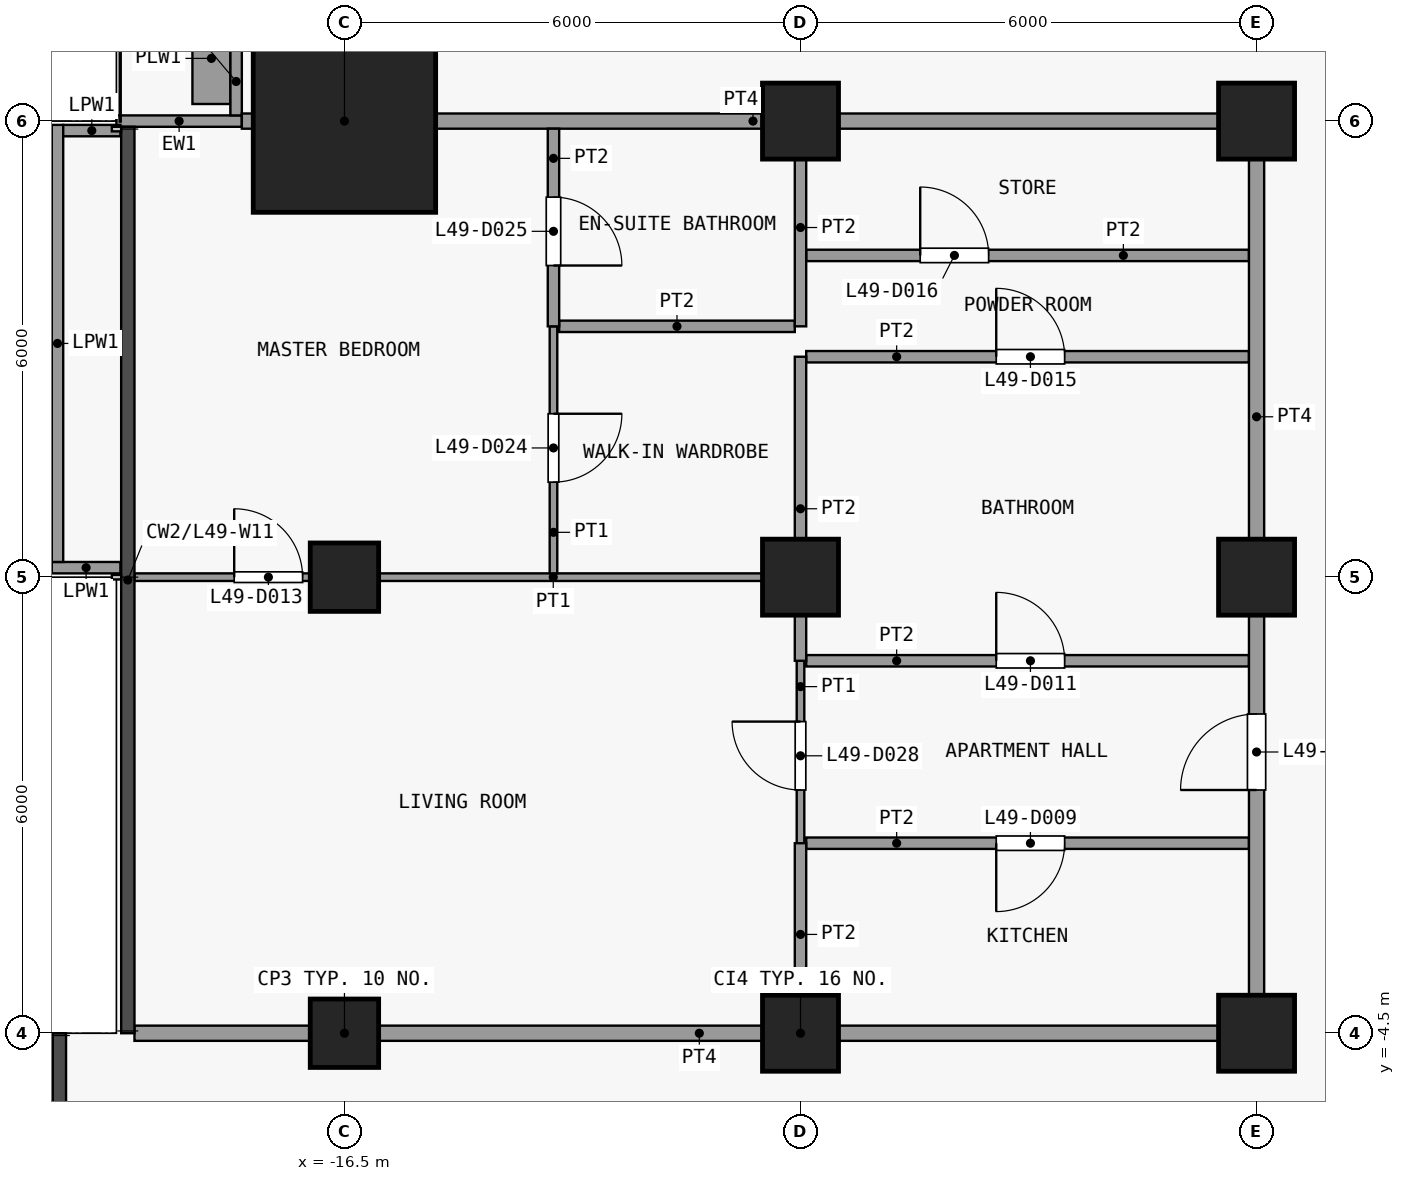
"""IFC4 building model, lengths in metres.
Left out: names, types, materials, properties, quantities, classifications, styles, units other than length and angle.
Written with IfcOpenShell. Run it as: python <this file> out.ifc"""

import sys

from ifc_helpers import new_model, si_unit, direction, frame, frame_2d, origin, origin_2d, place, context, subcontext, project, spatial, rectangle, extrude, element, fill, save


model = new_model("IFC4")
c1 = context("Model", 3, precision=1e-05, world=origin(), true_north=direction((0.0, 1.0)))
c2 = subcontext(c1, "Body", "Model", "MODEL_VIEW")
j1 = project(units=[si_unit("LENGTHUNIT", "METRE"), si_unit("PLANEANGLEUNIT", "RADIAN")], contexts=[c1])
p1 = place(None, origin())
s1 = spatial("IfcSite", under=j1, at=p1, CompositionType="ELEMENT")
p2 = place(p1, origin())
s2 = spatial("IfcBuilding", under=s1, at=p2, CompositionType="ELEMENT")
p3 = place(p2, frame((0.0, 0.0, 196.1)))
s3 = spatial("IfcBuildingStorey", under=s2, at=p3, CompositionType="ELEMENT", Elevation=196.1)
for number, where, z_axis, x_axis in (
    (1, (-16.5, -4.5, 0.0), (0.0, 0.0, 1.0), (1.0, 0.0, 0.0)),
    (2, (-16.5, 1.5, 0.0), (0.0, 0.0, 1.0), (1.0, 0.0, 0.0)),
):
    element("IfcColumn", number, at=place(p3, frame(where, z_axis=z_axis, x_axis=x_axis)), inside=s3, PredefinedType="COLUMN", context=c2, shape_type="SweptSolid", body=[
        extrude(rectangle(XDim=0.9, YDim=0.9, at=origin_2d()), origin(), (0.0, 0.0, 1.0), 3.6),
    ])
p4 = place(p3, frame((-16.5, 7.5, 0.0), z_axis=(0.0, 0.0, 1.0), x_axis=(1.0, 0.0, 0.0)))
e3 = element("IfcColumn", 3, at=p4, inside=s3, PredefinedType="COLUMN", context=c2, shape_type="SweptSolid", body=[
    extrude(rectangle(XDim=2.4, YDim=2.4, at=origin_2d()), origin(), (0.0, 0.0, 1.0), 3.6),
])
for number, where, z_axis, x_axis in (
    (4, (-10.5, -4.5, 0.0), (0.0, 0.0, 1.0), (1.0, 0.0, 0.0)),
    (5, (-10.5, 1.5, 0.0), (0.0, 0.0, 1.0), (1.0, 0.0, 0.0)),
    (6, (-10.5, 7.5, 0.0), (0.0, 0.0, 1.0), (1.0, 0.0, 0.0)),
    (7, (-4.5, -4.5, 0.0), (0.0, 0.0, 1.0), (1.0, 0.0, 0.0)),
    (8, (-4.5, 1.5, 0.0), (0.0, 0.0, 1.0), (1.0, 0.0, 0.0)),
    (9, (-4.5, 7.5, 0.0), (0.0, 0.0, 1.0), (1.0, 0.0, 0.0)),
):
    element("IfcColumn", number, at=place(p3, frame(where, z_axis=z_axis, x_axis=x_axis)), inside=s3, PredefinedType="COLUMN", context=c2, shape_type="SweptSolid", body=[
        extrude(rectangle(XDim=1.0, YDim=1.0, at=origin_2d()), origin(), (0.0, 0.0, 1.0), 3.6),
    ])
p5 = place(p3, frame((-17.85, 7.5, 0.0), z_axis=(0.0, 0.0, 1.0), x_axis=(-1.0, 0.0, 0.0)))
e10 = element("IfcWall", 10, at=p5, inside=s3, PredefinedType="SOLIDWALL", context=c2, shape_type="SweptSolid", body=[
    extrude(rectangle(XDim=1.65, YDim=0.15, at=frame_2d((0.825, 0.0))), origin(), (0.0, 0.0, 1.0), 3.15),
])
p6 = place(p3, frame((-17.925, 7.575, 0.0), z_axis=(0.0, 0.0, 1.0), x_axis=(0.0, 1.0, 0.0)))
e11 = element("IfcWall", 11, at=p6, inside=s3, PredefinedType="SOLIDWALL", context=c2, shape_type="SweptSolid", body=[
    extrude(rectangle(XDim=5.85, YDim=0.15, at=frame_2d((2.925, 0.0))), origin(), (0.0, 0.0, 1.0), 3.15),
])
p7 = place(p6, frame((3.825, 0.0, 0.0)))
e12 = element("IfcOpeningElement", 12, at=p7, cuts=e11, PredefinedType="OPENING", context=c2, shape_type="SweptSolid", body=[
    extrude(rectangle(XDim=1.2, YDim=2.4, at=frame_2d((0.6, 1.2))), frame((0.0, 0.085, 0.0), z_axis=(0.0, -1.0, 0.0), x_axis=(1.0, 0.0, 0.0)), (0.0, 0.0, 1.0), 0.17),
])
p8 = place(p6, frame((1.012, 0.0, 0.9)))
e13 = element("IfcOpeningElement", 13, at=p8, cuts=e11, PredefinedType="OPENING", context=c2, shape_type="SweptSolid", body=[
    extrude(rectangle(XDim=1.8, YDim=2.1, at=frame_2d((0.9, 1.05))), frame((0.0, 0.085, 0.0), z_axis=(0.0, -1.0, 0.0), x_axis=(1.0, 0.0, 0.0)), (0.0, 0.0, 1.0), 0.17),
])
p9 = place(p3, frame((-18.25, 7.725, 0.0), z_axis=(0.0, 0.0, 1.0), x_axis=(0.0, 1.0, 0.0)))
e14 = element("IfcWall", 14, at=p9, inside=s3, PredefinedType="USERDEFINED", context=c2, shape_type="SweptSolid", body=[
    extrude(rectangle(XDim=1.2, YDim=0.5, at=frame_2d((0.6, 0.0))), origin(), (0.0, 0.0, 1.0), 0.9),
])
p10 = place(p3, frame((-19.448, 1.625, 0.0), z_axis=(0.0, 0.0, 1.0), x_axis=(-1.0, 0.0, 0.0)))
e15 = element("IfcWall", 15, at=p10, inside=s3, PredefinedType="PARAPET", context=c2, shape_type="SweptSolid", body=[
    extrude(rectangle(XDim=0.903, YDim=0.15, at=frame_2d((0.451, 0.0))), origin(), (0.0, 0.0, 1.0), 1.15),
])
p11 = place(p3, frame((-20.275, 1.7, 0.0), z_axis=(0.0, 0.0, 1.0), x_axis=(0.0, 1.0, 0.0)))
e16 = element("IfcWall", 16, at=p11, inside=s3, PredefinedType="PARAPET", context=c2, shape_type="SweptSolid", body=[
    extrude(rectangle(XDim=5.75, YDim=0.15, at=frame_2d((2.875, 0.0))), origin(), (0.0, 0.0, 1.0), 1.15),
])
p12 = place(p3, frame((-20.2, 7.375, 0.0), z_axis=(0.0, 0.0, 1.0), x_axis=(1.0, 0.0, 0.0)))
e17 = element("IfcWall", 17, at=p12, inside=s3, PredefinedType="PARAPET", context=c2, shape_type="SweptSolid", body=[
    extrude(rectangle(XDim=0.752, YDim=0.15, at=frame_2d((0.376, 0.0))), origin(), (0.0, 0.0, 1.0), 1.15),
])
p13 = place(p3, frame((-19.262, -4.5, 0.0), z_axis=(0.0, 0.0, 1.0), x_axis=(1.0, 0.0, 0.0)))
e18 = element("IfcWall", 18, at=p13, inside=s3, PredefinedType="PARTITIONING", context=c2, shape_type="SweptSolid", body=[
    extrude(rectangle(XDim=14.863, YDim=0.2, at=frame_2d((7.431, 0.0))), origin(), (0.0, 0.0, 1.0), 3.15),
])
p14 = place(p3, frame((-10.425, -2.0, 0.0), z_axis=(0.0, 0.0, 1.0), x_axis=(1.0, 0.0, 0.0)))
e19 = element("IfcWall", 19, at=p14, inside=s3, PredefinedType="PARTITIONING", context=c2, shape_type="SweptSolid", body=[
    extrude(rectangle(XDim=5.825, YDim=0.15, at=frame_2d((2.913, 0.0))), origin(), (0.0, 0.0, 1.0), 3.15),
])
p15 = place(p14, frame((2.5, 0.0, 0.0)))
e20 = element("IfcOpeningElement", 20, at=p15, cuts=e19, PredefinedType="OPENING", context=c2, shape_type="SweptSolid", body=[
    extrude(rectangle(XDim=0.9, YDim=2.1, at=frame_2d((0.45, 1.05))), frame((0.0, 0.085, 0.0), z_axis=(0.0, -1.0, 0.0), x_axis=(1.0, 0.0, 0.0)), (0.0, 0.0, 1.0), 0.17),
])
p16 = place(p3, frame((-10.425, 0.4, 0.0), z_axis=(0.0, 0.0, 1.0), x_axis=(1.0, 0.0, 0.0)))
e21 = element("IfcWall", 21, at=p16, inside=s3, PredefinedType="PARTITIONING", context=c2, shape_type="SweptSolid", body=[
    extrude(rectangle(XDim=5.825, YDim=0.15, at=frame_2d((2.913, 0.0))), origin(), (0.0, 0.0, 1.0), 3.15),
])
p17 = place(p16, frame((2.5, 0.0, 0.0)))
e22 = element("IfcOpeningElement", 22, at=p17, cuts=e21, PredefinedType="OPENING", context=c2, shape_type="SweptSolid", body=[
    extrude(rectangle(XDim=0.9, YDim=2.1, at=frame_2d((0.45, 1.05))), frame((0.0, 0.085, 0.0), z_axis=(0.0, -1.0, 0.0), x_axis=(1.0, 0.0, 0.0)), (0.0, 0.0, 1.0), 0.17),
])
p18 = place(p3, frame((-19.262, 1.5, 0.0), z_axis=(0.0, 0.0, 1.0), x_axis=(1.0, 0.0, 0.0)))
e23 = element("IfcWall", 23, at=p18, inside=s3, PredefinedType="PARTITIONING", context=c2, shape_type="SweptSolid", body=[
    extrude(rectangle(XDim=8.688, YDim=0.1, at=frame_2d((4.344, 0.0))), origin(), (0.0, 0.0, 1.0), 3.15),
])
p19 = place(p18, frame((1.312, 0.0, 0.0)))
e24 = element("IfcOpeningElement", 24, at=p19, cuts=e23, PredefinedType="OPENING", context=c2, shape_type="SweptSolid", body=[
    extrude(rectangle(XDim=0.9, YDim=2.1, at=frame_2d((0.45, 1.05))), frame((0.0, 0.06, 0.0), z_axis=(0.0, -1.0, 0.0), x_axis=(1.0, 0.0, 0.0)), (0.0, 0.0, 1.0), 0.12),
])
p20 = place(p3, frame((-10.425, 4.4, 0.0), z_axis=(0.0, 0.0, 1.0), x_axis=(1.0, 0.0, 0.0)))
e25 = element("IfcWall", 25, at=p20, inside=s3, PredefinedType="PARTITIONING", context=c2, shape_type="SweptSolid", body=[
    extrude(rectangle(XDim=5.825, YDim=0.15, at=frame_2d((2.913, 0.0))), origin(), (0.0, 0.0, 1.0), 3.15),
])
p21 = place(p20, frame((2.5, 0.0, 0.0)))
e26 = element("IfcOpeningElement", 26, at=p21, cuts=e25, PredefinedType="OPENING", context=c2, shape_type="SweptSolid", body=[
    extrude(rectangle(XDim=0.9, YDim=2.1, at=frame_2d((0.45, 1.05))), frame((0.0, 0.085, 0.0), z_axis=(0.0, -1.0, 0.0), x_axis=(1.0, 0.0, 0.0)), (0.0, 0.0, 1.0), 0.17),
])
p22 = place(p3, frame((-13.675, 4.8, 0.0), z_axis=(0.0, 0.0, 1.0), x_axis=(1.0, 0.0, 0.0)))
e27 = element("IfcWall", 27, at=p22, inside=s3, PredefinedType="PARTITIONING", context=c2, shape_type="SweptSolid", body=[
    extrude(rectangle(XDim=3.1, YDim=0.15, at=frame_2d((1.55, 0.0))), origin(), (0.0, 0.0, 1.0), 3.15),
])
p23 = place(p3, frame((-10.425, 5.733, 0.0), z_axis=(0.0, 0.0, 1.0), x_axis=(1.0, 0.0, 0.0)))
e28 = element("IfcWall", 28, at=p23, inside=s3, PredefinedType="PARTITIONING", context=c2, shape_type="SweptSolid", body=[
    extrude(rectangle(XDim=5.825, YDim=0.15, at=frame_2d((2.913, 0.0))), origin(), (0.0, 0.0, 1.0), 3.15),
])
p24 = place(p23, frame((1.5, 0.0, 0.0)))
e29 = element("IfcOpeningElement", 29, at=p24, cuts=e28, PredefinedType="OPENING", context=c2, shape_type="SweptSolid", body=[
    extrude(rectangle(XDim=0.9, YDim=2.1, at=frame_2d((0.45, 1.05))), frame((0.0, 0.085, 0.0), z_axis=(0.0, -1.0, 0.0), x_axis=(1.0, 0.0, 0.0)), (0.0, 0.0, 1.0), 0.17),
])
p25 = place(p3, frame((-17.85, 7.5, 0.0), z_axis=(0.0, 0.0, 1.0), x_axis=(1.0, 0.0, 0.0)))
e30 = element("IfcWall", 30, at=p25, inside=s3, PredefinedType="PARTITIONING", context=c2, shape_type="SweptSolid", body=[
    extrude(rectangle(XDim=13.45, YDim=0.2, at=frame_2d((6.725, 0.0))), origin(), (0.0, 0.0, 1.0), 3.15),
])
p26 = place(p3, frame((-13.75, 1.55, 0.0), z_axis=(0.0, 0.0, 1.0), x_axis=(0.0, 1.0, 0.0)))
e31 = element("IfcWall", 31, at=p26, inside=s3, PredefinedType="PARTITIONING", context=c2, shape_type="SweptSolid", body=[
    extrude(rectangle(XDim=3.25, YDim=0.1, at=frame_2d((1.625, 0.0))), origin(), (0.0, 0.0, 1.0), 3.15),
])
p27 = place(p26, frame((1.2, 0.0, 0.0)))
e32 = element("IfcOpeningElement", 32, at=p27, cuts=e31, PredefinedType="OPENING", context=c2, shape_type="SweptSolid", body=[
    extrude(rectangle(XDim=0.9, YDim=2.1, at=frame_2d((0.45, 1.05))), frame((0.0, 0.06, 0.0), z_axis=(0.0, -1.0, 0.0), x_axis=(1.0, 0.0, 0.0)), (0.0, 0.0, 1.0), 0.12),
])
p28 = place(p3, frame((-13.75, 4.8, 0.0), z_axis=(0.0, 0.0, 1.0), x_axis=(0.0, 1.0, 0.0)))
e33 = element("IfcWall", 33, at=p28, inside=s3, PredefinedType="PARTITIONING", context=c2, shape_type="SweptSolid", body=[
    extrude(rectangle(XDim=2.6, YDim=0.15, at=frame_2d((1.3, 0.0))), origin(), (0.0, 0.0, 1.0), 3.15),
])
p29 = place(p28, frame((0.8, 0.0, 0.0)))
e34 = element("IfcOpeningElement", 34, at=p29, cuts=e33, PredefinedType="OPENING", context=c2, shape_type="SweptSolid", body=[
    extrude(rectangle(XDim=0.9, YDim=2.1, at=frame_2d((0.45, 1.05))), frame((0.0, 0.085, 0.0), z_axis=(0.0, -1.0, 0.0), x_axis=(1.0, 0.0, 0.0)), (0.0, 0.0, 1.0), 0.17),
])
p30 = place(p3, frame((-10.5, -2.0, 0.0), z_axis=(0.0, 0.0, 1.0), x_axis=(0.0, 1.0, 0.0)))
e35 = element("IfcWall", 35, at=p30, inside=s3, PredefinedType="PARTITIONING", context=c2, shape_type="SweptSolid", body=[
    extrude(rectangle(XDim=2.4, YDim=0.1, at=frame_2d((1.2, 0.0))), origin(), (0.0, 0.0, 1.0), 3.15),
])
p31 = place(p30, frame((0.7, 0.0, 0.0)))
e36 = element("IfcOpeningElement", 36, at=p31, cuts=e35, PredefinedType="OPENING", context=c2, shape_type="SweptSolid", body=[
    extrude(rectangle(XDim=0.9, YDim=2.1, at=frame_2d((0.45, 1.05))), frame((0.0, 0.06, 0.0), z_axis=(0.0, -1.0, 0.0), x_axis=(1.0, 0.0, 0.0)), (0.0, 0.0, 1.0), 0.12),
])
p32 = place(p3, frame((-10.5, -4.4, 0.0), z_axis=(0.0, 0.0, 1.0), x_axis=(0.0, 1.0, 0.0)))
e37 = element("IfcWall", 37, at=p32, inside=s3, PredefinedType="PARTITIONING", context=c2, shape_type="SweptSolid", body=[
    extrude(rectangle(XDim=2.4, YDim=0.15, at=frame_2d((1.2, 0.0))), origin(), (0.0, 0.0, 1.0), 3.15),
])
p33 = place(p3, frame((-10.5, 0.4, 0.0), z_axis=(0.0, 0.0, 1.0), x_axis=(0.0, 1.0, 0.0)))
e38 = element("IfcWall", 38, at=p33, inside=s3, PredefinedType="PARTITIONING", context=c2, shape_type="SweptSolid", body=[
    extrude(rectangle(XDim=4.0, YDim=0.15, at=frame_2d((2.0, 0.0))), origin(), (0.0, 0.0, 1.0), 3.15),
])
p34 = place(p3, frame((-10.5, 4.8, 0.0), z_axis=(0.0, 0.0, 1.0), x_axis=(0.0, 1.0, 0.0)))
e39 = element("IfcWall", 39, at=p34, inside=s3, PredefinedType="PARTITIONING", context=c2, shape_type="SweptSolid", body=[
    extrude(rectangle(XDim=2.6, YDim=0.15, at=frame_2d((1.3, 0.0))), origin(), (0.0, 0.0, 1.0), 3.15),
])
p35 = place(p3, frame((-4.5, -4.4, 0.0), z_axis=(0.0, 0.0, 1.0), x_axis=(0.0, 1.0, 0.0)))
e40 = element("IfcWall", 40, at=p35, inside=s3, PredefinedType="PARTITIONING", context=c2, shape_type="SweptSolid", body=[
    extrude(rectangle(XDim=11.8, YDim=0.2, at=frame_2d((5.9, 0.0))), origin(), (0.0, 0.0, 1.0), 3.15),
])
p36 = place(p35, frame((3.1, 0.0, 0.0)))
e41 = element("IfcOpeningElement", 41, at=p36, cuts=e40, PredefinedType="OPENING", context=c2, shape_type="SweptSolid", body=[
    extrude(rectangle(XDim=1.0, YDim=2.1, at=frame_2d((0.5, 1.05))), frame((0.0, 0.11, 0.0), z_axis=(0.0, -1.0, 0.0), x_axis=(1.0, 0.0, 0.0)), (0.0, 0.0, 1.0), 0.22),
])
p37 = place(p15, origin())
e42 = element("IfcDoor", 42, at=p37, inside=s3, OperationType="SINGLE_SWING_LEFT", PredefinedType="DOOR", context=c2, shape_type="SweptSolid", body=[
    extrude(rectangle(XDim=0.9, YDim=2.1, at=frame_2d((0.45, 1.05))), frame((0.0, 0.025, 0.0), z_axis=(0.0, -1.0, 0.0), x_axis=(1.0, 0.0, 0.0)), (0.0, 0.0, 1.0), 0.05),
])
fill(e20, e42)
p38 = place(p17, origin())
e43 = element("IfcDoor", 43, at=p38, inside=s3, OperationType="SINGLE_SWING_RIGHT", PredefinedType="DOOR", context=c2, shape_type="SweptSolid", body=[
    extrude(rectangle(XDim=0.9, YDim=2.1, at=frame_2d((0.45, 1.05))), frame((0.0, 0.025, 0.0), z_axis=(0.0, -1.0, 0.0), x_axis=(1.0, 0.0, 0.0)), (0.0, 0.0, 1.0), 0.05),
])
fill(e22, e43)
p39 = place(p19, origin())
e44 = element("IfcDoor", 44, at=p39, inside=s3, OperationType="SINGLE_SWING_RIGHT", PredefinedType="DOOR", context=c2, shape_type="SweptSolid", body=[
    extrude(rectangle(XDim=0.9, YDim=2.1, at=frame_2d((0.45, 1.05))), frame((0.0, 0.025, 0.0), z_axis=(0.0, -1.0, 0.0), x_axis=(1.0, 0.0, 0.0)), (0.0, 0.0, 1.0), 0.05),
])
fill(e24, e44)
p40 = place(p21, origin())
e45 = element("IfcDoor", 45, at=p40, inside=s3, OperationType="SINGLE_SWING_RIGHT", PredefinedType="DOOR", context=c2, shape_type="SweptSolid", body=[
    extrude(rectangle(XDim=0.9, YDim=2.1, at=frame_2d((0.45, 1.05))), frame((0.0, 0.025, 0.0), z_axis=(0.0, -1.0, 0.0), x_axis=(1.0, 0.0, 0.0)), (0.0, 0.0, 1.0), 0.05),
])
fill(e26, e45)
p41 = place(p24, origin())
e46 = element("IfcDoor", 46, at=p41, inside=s3, OperationType="SINGLE_SWING_RIGHT", PredefinedType="DOOR", context=c2, shape_type="SweptSolid", body=[
    extrude(rectangle(XDim=0.9, YDim=2.1, at=frame_2d((0.45, 1.05))), frame((0.0, 0.025, 0.0), z_axis=(0.0, -1.0, 0.0), x_axis=(1.0, 0.0, 0.0)), (0.0, 0.0, 1.0), 0.05),
])
fill(e29, e46)
p42 = place(p27, origin())
e47 = element("IfcDoor", 47, at=p42, inside=s3, OperationType="SINGLE_SWING_RIGHT", PredefinedType="DOOR", context=c2, shape_type="SweptSolid", body=[
    extrude(rectangle(XDim=0.9, YDim=2.1, at=frame_2d((0.45, 1.05))), frame((0.0, 0.025, 0.0), z_axis=(0.0, -1.0, 0.0), x_axis=(1.0, 0.0, 0.0)), (0.0, 0.0, 1.0), 0.05),
])
fill(e32, e47)
p43 = place(p29, origin())
e48 = element("IfcDoor", 48, at=p43, inside=s3, OperationType="SINGLE_SWING_LEFT", PredefinedType="DOOR", context=c2, shape_type="SweptSolid", body=[
    extrude(rectangle(XDim=0.9, YDim=2.1, at=frame_2d((0.45, 1.05))), frame((0.0, 0.025, 0.0), z_axis=(0.0, -1.0, 0.0), x_axis=(1.0, 0.0, 0.0)), (0.0, 0.0, 1.0), 0.05),
])
fill(e34, e48)
p44 = place(p31, origin())
e49 = element("IfcDoor", 49, at=p44, inside=s3, OperationType="SINGLE_SWING_LEFT", PredefinedType="DOOR", context=c2, shape_type="SweptSolid", body=[
    extrude(rectangle(XDim=0.9, YDim=2.1, at=frame_2d((0.45, 1.05))), frame((0.0, 0.025, 0.0), z_axis=(0.0, -1.0, 0.0), x_axis=(1.0, 0.0, 0.0)), (0.0, 0.0, 1.0), 0.05),
])
fill(e36, e49)
p45 = place(p36, origin())
e50 = element("IfcDoor", 50, at=p45, inside=s3, OperationType="SINGLE_SWING_RIGHT", PredefinedType="DOOR", context=c2, shape_type="SweptSolid", body=[
    extrude(rectangle(XDim=1.0, YDim=2.1, at=frame_2d((0.5, 1.05))), frame((0.0, 0.025, 0.0), z_axis=(0.0, -1.0, 0.0), x_axis=(1.0, 0.0, 0.0)), (0.0, 0.0, 1.0), 0.05),
])
fill(e41, e50)
save(model, sys.argv[1])
